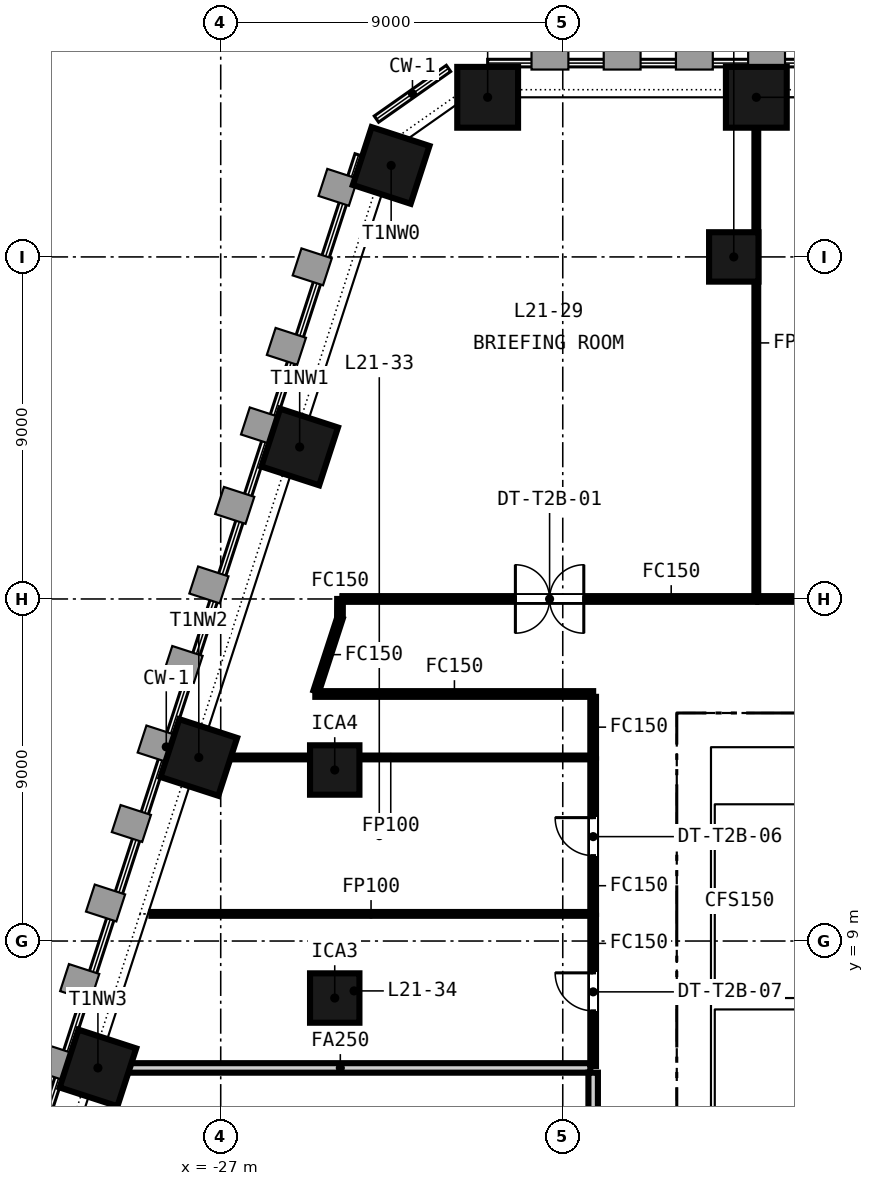
"""IFC4 building model, lengths in metres.
Left out: names, types, materials, properties, quantities, classifications, styles, units other than length and angle.
Written with IfcOpenShell. Run it as: python <this file> out.ifc"""

import sys

from ifc_helpers import new_model, si_unit, direction, frame, frame_2d, origin, origin_2d, place, context, subcontext, project, spatial, rectangle, extrude, element, fill, save


model = new_model("IFC4")
c1 = context("Model", 3, precision=1e-05, world=origin(), true_north=direction((0.0, 1.0)))
c2 = subcontext(c1, "Body", "Model", "MODEL_VIEW")
j1 = project(units=[si_unit("LENGTHUNIT", "METRE"), si_unit("PLANEANGLEUNIT", "RADIAN")], contexts=[c1])
p1 = place(None, origin())
s1 = spatial("IfcSite", under=j1, at=p1, CompositionType="ELEMENT")
p2 = place(p1, origin())
s2 = spatial("IfcBuilding", under=s1, at=p2, CompositionType="ELEMENT")
p3 = place(p2, frame((0.0, 0.0, 91.6)))
s3 = spatial("IfcBuildingStorey", under=s2, at=p3, CompositionType="ELEMENT", Elevation=91.6)
p4 = place(p3, frame((-15.0, 14.55, -0.15), z_axis=(0.0, 0.0, 1.0), x_axis=(1.0, 0.0, 0.0)))
e1 = element("IfcWall", 1, at=p4, inside=s3, PredefinedType="SOLIDWALL", context=c2, shape_type="SweptSolid", body=[
    extrude(rectangle(XDim=30.0, YDim=0.9, at=frame_2d((15.0, 0.0))), origin(), (0.0, 0.0, 1.0), 3.65),
])
p5 = place(p4, frame((9.25, 0.0, 0.15)))
e2 = element("IfcOpeningElement", 2, at=p5, cuts=e1, PredefinedType="OPENING", context=c2, shape_type="SweptSolid", body=[
    extrude(rectangle(XDim=1.5, YDim=2.1, at=frame_2d((0.75, 1.05))), frame((0.0, 0.46, 0.0), z_axis=(0.0, -1.0, 0.0), x_axis=(1.0, 0.0, 0.0)), (0.0, 0.0, 1.0), 0.92),
])
p6 = place(p4, frame((19.4, 0.0, 0.15)))
e3 = element("IfcOpeningElement", 3, at=p6, cuts=e1, PredefinedType="OPENING", context=c2, shape_type="SweptSolid", body=[
    extrude(rectangle(XDim=1.5, YDim=2.1, at=frame_2d((0.75, 1.05))), frame((0.0, 0.46, 0.0), z_axis=(0.0, -1.0, 0.0), x_axis=(1.0, 0.0, 0.0)), (0.0, 0.0, 1.0), 0.92),
])
p7 = place(p4, frame((1.5, 0.0, 0.15)))
e4 = element("IfcOpeningElement", 4, at=p7, cuts=e1, PredefinedType="OPENING", context=c2, shape_type="SweptSolid", body=[
    extrude(rectangle(XDim=1.2, YDim=2.1, at=frame_2d((0.6, 1.05))), frame((0.0, 0.46, 0.0), z_axis=(0.0, -1.0, 0.0), x_axis=(1.0, 0.0, 0.0)), (0.0, 0.0, 1.0), 0.92),
])
p8 = place(p4, frame((27.3, 0.0, 0.15)))
e5 = element("IfcOpeningElement", 5, at=p8, cuts=e1, PredefinedType="OPENING", context=c2, shape_type="SweptSolid", body=[
    extrude(rectangle(XDim=1.2, YDim=2.1, at=frame_2d((0.6, 1.05))), frame((0.0, 0.46, 0.0), z_axis=(0.0, -1.0, 0.0), x_axis=(1.0, 0.0, 0.0)), (0.0, 0.0, 1.0), 0.92),
])
p9 = place(p3, frame((-14.55, 0.9, -0.15), z_axis=(0.0, 0.0, 1.0), x_axis=(0.0, 1.0, 0.0)))
e6 = element("IfcWall", 6, at=p9, inside=s3, PredefinedType="SOLIDWALL", context=c2, shape_type="SweptSolid", body=[
    extrude(rectangle(XDim=13.2, YDim=0.9, at=frame_2d((6.6, 0.0))), origin(), (0.0, 0.0, 1.0), 3.65),
])
for number, where, z_axis, x_axis in (
    (7, (-12.907, 31.2, -0.15), (0.0, 0.0, 1.0), (-1.0, 0.0, 0.0)),
    (8, (-19.976, 31.2, -0.15), (0.0, 0.0, 1.0), (-1.0, 0.0, 0.0)),
    (9, (-22.515, 29.407, -0.15), (0.0, 0.0, 1.0), (-0.309, -0.951, 0.0)),
    (10, (-24.923, 21.999, -0.15), (0.0, 0.0, 1.0), (-0.309, -0.951, 0.0)),
    (11, (-27.577, 13.83, -0.15), (0.0, 0.0, 1.0), (-0.309, -0.951, 0.0)),
    (12, (-30.231, 5.661, -0.15), (0.0, 0.0, 1.0), (-0.309, -0.951, 0.0)),
):
    element("IfcColumn", number, at=place(p3, frame(where, z_axis=z_axis, x_axis=x_axis)), inside=s3, PredefinedType="COLUMN", context=c2, shape_type="SweptSolid", body=[
        extrude(rectangle(XDim=1.6, YDim=1.6, at=origin_2d()), origin(), (0.0, 0.0, 1.0), 3.65),
    ])
for number, where, z_axis, x_axis in (
    (13, (-24.0, 7.5, -0.15), (0.0, 0.0, 1.0), (1.0, 0.0, 0.0)),
    (14, (-24.0, 13.5, -0.15), (0.0, 0.0, 1.0), (1.0, 0.0, 0.0)),
    (15, (-13.5, 27.0, -0.15), (0.0, 0.0, 1.0), (1.0, 0.0, 0.0)),
):
    element("IfcColumn", number, at=place(p3, frame(where, z_axis=z_axis, x_axis=x_axis)), inside=s3, PredefinedType="COLUMN", context=c2, shape_type="SweptSolid", body=[
        extrude(rectangle(XDim=1.3, YDim=1.3, at=origin_2d()), origin(), (0.0, 0.0, 1.0), 3.65),
    ])
p10 = place(p3, frame((-14.0, 7.35, 0.0), z_axis=(0.0, 0.0, 1.0), x_axis=(1.0, 0.0, 0.0)))
e16 = element("IfcWall", 16, at=p10, inside=s3, PredefinedType="SOLIDWALL", context=c2, shape_type="SweptSolid", body=[
    extrude(rectangle(XDim=2.95, YDim=0.3, at=frame_2d((1.475, 0.0))), origin(), (0.0, 0.0, 1.0), 3.5),
])
p11 = place(p3, frame((-14.05, 0.9, 0.0), z_axis=(0.0, 0.0, 1.0), x_axis=(0.0, 1.0, 0.0)))
e17 = element("IfcWall", 17, at=p11, inside=s3, PredefinedType="SOLIDWALL", context=c2, shape_type="SweptSolid", body=[
    extrude(rectangle(XDim=13.2, YDim=0.1, at=frame_2d((6.6, 0.0))), origin(), (0.0, 0.0, 1.0), 3.5),
])
p12 = place(p3, frame((-17.2, 15.5, 0.0), z_axis=(0.0, 0.0, 1.0), x_axis=(-1.0, 0.0, 0.0)))
e18 = element("IfcWall", 18, at=p12, inside=s3, PredefinedType="PARTITIONING", context=c2, shape_type="SweptSolid", body=[
    extrude(rectangle(XDim=7.311, YDim=0.15, at=frame_2d((3.656, 0.0))), origin(), (0.0, 0.0, 1.0), 2.741),
])
p13 = place(p3, frame((-24.488, 15.571, 0.0), z_axis=(0.0, 0.0, 1.0), x_axis=(0.309031629186, 0.951051761032, 0.0)))
e19 = element("IfcWall", 19, at=p13, inside=s3, PredefinedType="PARTITIONING", context=c2, shape_type="SweptSolid", body=[
    extrude(rectangle(XDim=2.028, YDim=0.15, at=frame_2d((1.014, 0.0))), origin(), (0.0, 0.0, 1.0), 2.741),
])
p14 = place(p3, frame((-23.863, 17.573, 0.0), z_axis=(0.0, 0.0, 1.0), x_axis=(0.004002254967, 0.999991990946, 0.0)))
e20 = element("IfcWall", 20, at=p14, inside=s3, PredefinedType="PARTITIONING", context=c2, shape_type="SweptSolid", body=[
    extrude(rectangle(XDim=0.427, YDim=0.15, at=frame_2d((0.213, 0.0))), origin(), (0.0, 0.0, 1.0), 2.741),
])
p15 = place(p3, frame((-23.786, 18.0, 0.0), z_axis=(0.0, 0.0, 1.0), x_axis=(1.0, 0.0, 0.0)))
e21 = element("IfcWall", 21, at=p15, inside=s3, PredefinedType="PARTITIONING", context=c2, shape_type="SweptSolid", body=[
    extrude(rectangle(XDim=10.879, YDim=0.15, at=frame_2d((5.439, 0.0))), origin(), (0.0, 0.0, 1.0), 2.741),
])
p16 = place(p15, frame((4.54, 0.0, 0.0)))
e22 = element("IfcOpeningElement", 22, at=p16, cuts=e21, PredefinedType="OPENING", context=c2, shape_type="SweptSolid", body=[
    extrude(rectangle(XDim=1.8, YDim=2.1, at=frame_2d((0.9, 1.05))), frame((0.0, 0.085, 0.0), z_axis=(0.0, -1.0, 0.0), x_axis=(1.0, 0.0, 0.0)), (0.0, 0.0, 1.0), 0.17),
])
p17 = place(p3, frame((-17.2, 13.83, 0.0), z_axis=(0.0, 0.0, 1.0), x_axis=(0.0, 1.0, 0.0)))
e23 = element("IfcWall", 23, at=p17, inside=s3, PredefinedType="PARTITIONING", context=c2, shape_type="SweptSolid", body=[
    extrude(rectangle(XDim=1.595, YDim=0.15, at=frame_2d((0.797, 0.0))), origin(), (0.0, 0.0, 1.0), 2.741),
])
p18 = place(p3, frame((-12.907, 18.075, 0.0), z_axis=(0.0, 0.0, 1.0), x_axis=(0.0, 1.0, 0.0)))
e24 = element("IfcWall", 24, at=p18, inside=s3, PredefinedType="PARTITIONING", context=c2, shape_type="SweptSolid", body=[
    extrude(rectangle(XDim=13.325, YDim=0.1, at=frame_2d((6.663, 0.0))), origin(), (0.0, 0.0, 1.0), 2.741),
])
p19 = place(p3, frame((-27.787, 13.83, 0.0), z_axis=(0.0, 0.0, 1.0), x_axis=(1.0, 0.0, 0.0)))
e25 = element("IfcWall", 25, at=p19, inside=s3, PredefinedType="PARTITIONING", context=c2, shape_type="SweptSolid", body=[
    extrude(rectangle(XDim=10.512, YDim=0.1, at=frame_2d((5.256, 0.0))), origin(), (0.0, 0.0, 1.0), 2.741),
])
p20 = place(p3, frame((-12.857, 18.0, 0.0), z_axis=(0.0, 0.0, 1.0), x_axis=(1.0, 0.0, 0.0)))
e26 = element("IfcWall", 26, at=p20, inside=s3, PredefinedType="PARTITIONING", context=c2, shape_type="SweptSolid", body=[
    extrude(rectangle(XDim=5.857, YDim=0.15, at=frame_2d((2.928, 0.0))), origin(), (0.0, 0.0, 1.0), 2.741),
])
p21 = place(p3, frame((-17.2, 9.714, 0.0), z_axis=(0.0, 0.0, 1.0), x_axis=(0.0, 1.0, 0.0)))
e27 = element("IfcWall", 27, at=p21, inside=s3, PredefinedType="PARTITIONING", context=c2, shape_type="SweptSolid", body=[
    extrude(rectangle(XDim=4.066, YDim=0.15, at=frame_2d((2.033, 0.0))), origin(), (0.0, 0.0, 1.0), 2.741),
])
p22 = place(p21, frame((1.533, 0.0, 0.0)))
e28 = element("IfcOpeningElement", 28, at=p22, cuts=e27, PredefinedType="OPENING", context=c2, shape_type="SweptSolid", body=[
    extrude(rectangle(XDim=1.0, YDim=2.1, at=frame_2d((0.5, 1.05))), frame((0.0, 0.085, 0.0), z_axis=(0.0, -1.0, 0.0), x_axis=(1.0, 0.0, 0.0)), (0.0, 0.0, 1.0), 0.17),
])
p23 = place(p3, frame((-28.824, 9.714, 0.0), z_axis=(0.0, 0.0, 1.0), x_axis=(1.0, 0.0, 0.0)))
e29 = element("IfcWall", 29, at=p23, inside=s3, PredefinedType="PARTITIONING", context=c2, shape_type="SweptSolid", body=[
    extrude(rectangle(XDim=11.549, YDim=0.1, at=frame_2d((5.774, 0.0))), origin(), (0.0, 0.0, 1.0), 2.741),
])
p24 = place(p3, frame((-17.2, 5.711, 0.0), z_axis=(0.0, 0.0, 1.0), x_axis=(0.0, 1.0, 0.0)))
e30 = element("IfcWall", 30, at=p24, inside=s3, PredefinedType="PARTITIONING", context=c2, shape_type="SweptSolid", body=[
    extrude(rectangle(XDim=3.953, YDim=0.15, at=frame_2d((1.977, 0.0))), origin(), (0.0, 0.0, 1.0), 2.741),
])
p25 = place(p24, frame((1.451, 0.0, 0.0)))
e31 = element("IfcOpeningElement", 31, at=p25, cuts=e30, PredefinedType="OPENING", context=c2, shape_type="SweptSolid", body=[
    extrude(rectangle(XDim=1.0, YDim=2.1, at=frame_2d((0.5, 1.05))), frame((0.0, 0.085, 0.0), z_axis=(0.0, -1.0, 0.0), x_axis=(1.0, 0.0, 0.0)), (0.0, 0.0, 1.0), 0.17),
])
p26 = place(p3, frame((-30.441, 5.661, 0.0), z_axis=(0.0, 0.0, 1.0), x_axis=(1.0, 0.0, 0.0)))
e32 = element("IfcWall", 32, at=p26, inside=s3, PredefinedType="PARTITIONING", context=c2, shape_type="SweptSolid", body=[
    extrude(rectangle(XDim=13.166, YDim=0.25, at=frame_2d((6.583, 0.0))), origin(), (0.0, 0.0, 1.0), 2.741),
])
p27 = place(p3, frame((-17.2, -3.188, 0.0), z_axis=(0.0, 0.0, 1.0), x_axis=(0.0, 1.0, 0.0)))
e33 = element("IfcWall", 33, at=p27, inside=s3, PredefinedType="PARTITIONING", context=c2, shape_type="SweptSolid", body=[
    extrude(rectangle(XDim=8.724, YDim=0.25, at=frame_2d((4.362, 0.0))), origin(), (0.0, 0.0, 1.0), 2.741),
])
p28 = place(p27, frame((3.462, 0.0, 0.0)))
e34 = element("IfcOpeningElement", 34, at=p28, cuts=e33, PredefinedType="OPENING", context=c2, shape_type="SweptSolid", body=[
    extrude(rectangle(XDim=1.8, YDim=2.1, at=frame_2d((0.9, 1.05))), frame((0.0, 0.135, 0.0), z_axis=(0.0, -1.0, 0.0), x_axis=(1.0, 0.0, 0.0)), (0.0, 0.0, 1.0), 0.27),
])
p29 = place(p7, origin())
e35 = element("IfcDoor", 35, at=p29, inside=s3, OperationType="SINGLE_SWING_RIGHT", PredefinedType="DOOR", context=c2, shape_type="SweptSolid", body=[
    extrude(rectangle(XDim=1.2, YDim=2.1, at=frame_2d((0.6, 1.05))), frame((0.0, 0.025, 0.0), z_axis=(0.0, -1.0, 0.0), x_axis=(1.0, 0.0, 0.0)), (0.0, 0.0, 1.0), 0.05),
])
fill(e4, e35)
p30 = place(p16, origin())
e36 = element("IfcDoor", 36, at=p30, inside=s3, OperationType="DOUBLE_DOOR_DOUBLE_SWING", PredefinedType="DOOR", context=c2, shape_type="SweptSolid", body=[
    extrude(rectangle(XDim=1.8, YDim=2.1, at=frame_2d((0.9, 1.05))), frame((0.0, 0.025, 0.0), z_axis=(0.0, -1.0, 0.0), x_axis=(1.0, 0.0, 0.0)), (0.0, 0.0, 1.0), 0.05),
])
fill(e22, e36)
p31 = place(p22, origin())
e37 = element("IfcDoor", 37, at=p31, inside=s3, OperationType="SINGLE_SWING_RIGHT", PredefinedType="DOOR", context=c2, shape_type="SweptSolid", body=[
    extrude(rectangle(XDim=1.0, YDim=2.1, at=frame_2d((0.5, 1.05))), frame((0.0, 0.025, 0.0), z_axis=(0.0, -1.0, 0.0), x_axis=(1.0, 0.0, 0.0)), (0.0, 0.0, 1.0), 0.05),
])
fill(e28, e37)
p32 = place(p25, origin())
e38 = element("IfcDoor", 38, at=p32, inside=s3, OperationType="SINGLE_SWING_RIGHT", PredefinedType="DOOR", context=c2, shape_type="SweptSolid", body=[
    extrude(rectangle(XDim=1.0, YDim=2.1, at=frame_2d((0.5, 1.05))), frame((0.0, 0.025, 0.0), z_axis=(0.0, -1.0, 0.0), x_axis=(1.0, 0.0, 0.0)), (0.0, 0.0, 1.0), 0.05),
])
fill(e31, e38)
save(model, sys.argv[1])
